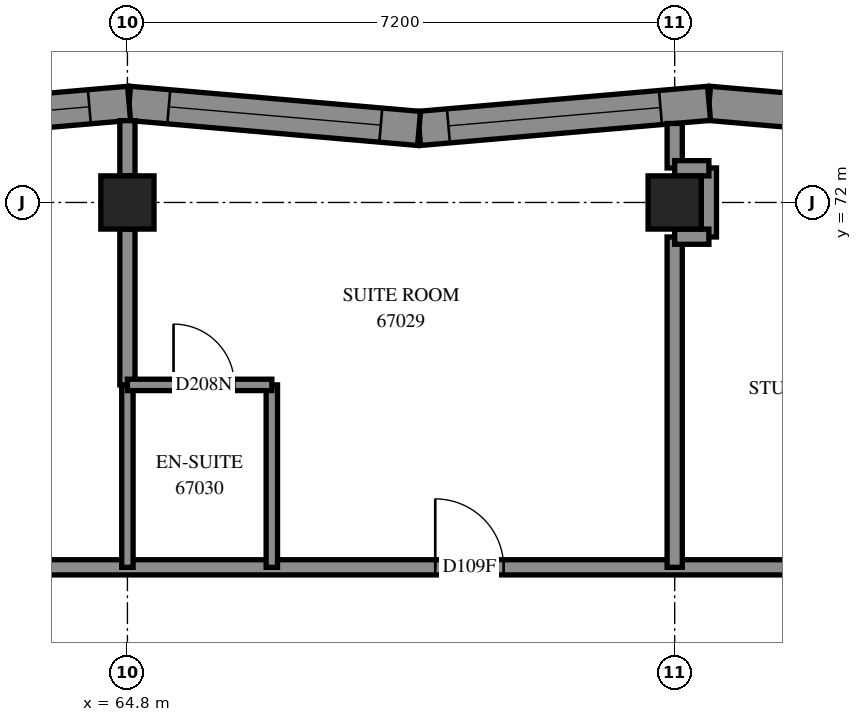
"""IFC4 building model, lengths in metres.
Left out: names, types, materials, properties, quantities, classifications, styles, units other than length and angle.
Written with IfcOpenShell. Run it as: python <this file> out.ifc"""

import sys

from ifc_helpers import new_model, si_unit, direction, frame, frame_2d, origin, origin_2d, place, context, subcontext, project, spatial, polyline, rectangle, outline, extrude, element, fill, save


model = new_model("IFC4")
c1 = context("Model", 3, precision=1e-05, world=origin(), true_north=direction((0.0, 1.0)))
c2 = subcontext(c1, "Body", "Model", "MODEL_VIEW")
j1 = project(units=[si_unit("LENGTHUNIT", "METRE"), si_unit("PLANEANGLEUNIT", "RADIAN")], contexts=[c1])
p1 = place(None, origin())
s1 = spatial("IfcSite", under=j1, at=p1, CompositionType="ELEMENT")
p2 = place(p1, origin())
s2 = spatial("IfcBuilding", under=s1, at=p2, CompositionType="ELEMENT")
p3 = place(p2, frame((0.0, 0.0, 247.2)))
s3 = spatial("IfcBuildingStorey", under=s2, at=p3, CompositionType="ELEMENT", Elevation=247.2)
for number, where, z_axis, x_axis in (
    (1, (64.8, 72.0, 0.0), (0.0, 0.0, 1.0), (1.0, 0.0, 0.0)),
    (2, (72.0, 72.0, 0.0), (0.0, 0.0, 1.0), (1.0, 0.0, 0.0)),
):
    element("IfcColumn", number, at=place(p3, frame(where, z_axis=z_axis, x_axis=x_axis)), inside=s3, PredefinedType="COLUMN", context=c2, shape_type="SweptSolid", body=[
        extrude(rectangle(XDim=0.7, YDim=0.7, at=origin_2d()), origin(), (0.0, 0.0, 1.0), 3.1),
    ])
p4 = place(p3, frame((76.285, 72.973, 0.0), z_axis=(0.0, 0.0, 1.0), x_axis=(-0.9962801831, 0.0861730629, 0.0)))
e3 = element("IfcWall", 3, at=p4, inside=s3, PredefinedType="SOLIDWALL", context=c2, shape_type="SweptSolid", body=[
    extrude(outline(polyline([(0.037, -0.225), (3.866, -0.225), (3.827, 0.225), (-0.037, 0.225), (0.037, -0.225)])), origin(), (0.0, 0.0, 1.0), 3.1),
])
p5 = place(p4, frame((1.557, 0.0, 0.45)))
e4 = element("IfcOpeningElement", 4, at=p5, cuts=e3, PredefinedType="OPENING", context=c2, shape_type="SweptSolid", body=[
    extrude(rectangle(XDim=1.2, YDim=2.55, at=frame_2d((0.6, 1.275))), frame((0.0, 0.235, 0.0), z_axis=(0.0, -1.0, 0.0), x_axis=(1.0, 0.0, 0.0)), (0.0, 0.0, 1.0), 0.47),
])
p6 = place(p3, frame((72.452, 73.304, 0.0), z_axis=(0.0, 0.0, 1.0), x_axis=(-0.9962800708, -0.0861743613, 0.0)))
e5 = element("IfcWall", 5, at=p6, inside=s3, PredefinedType="SOLIDWALL", context=c2, shape_type="SweptSolid", body=[
    extrude(outline(polyline([(-0.019, -0.225), (3.81, -0.225), (3.849, 0.225), (0.019, 0.225), (-0.019, -0.225)])), origin(), (0.0, 0.0, 1.0), 3.1),
])
p7 = place(p6, frame((0.641, 0.0, 0.45)))
e6 = element("IfcOpeningElement", 6, at=p7, cuts=e5, PredefinedType="OPENING", context=c2, shape_type="SweptSolid", body=[
    extrude(rectangle(XDim=2.8, YDim=2.55, at=frame_2d((1.4, 1.275))), frame((0.0, 0.235, 0.0), z_axis=(0.0, -1.0, 0.0), x_axis=(1.0, 0.0, 0.0)), (0.0, 0.0, 1.0), 0.47),
])
p8 = place(p3, frame((68.637, 72.974, 0.0), z_axis=(0.0, 0.0, 1.0), x_axis=(-0.9962798769, 0.0861766033, 0.0)))
e7 = element("IfcWall", 7, at=p8, inside=s3, PredefinedType="SOLIDWALL", context=c2, shape_type="SweptSolid", body=[
    extrude(outline(polyline([(0.019, -0.225), (3.849, -0.225), (3.81, 0.225), (-0.019, 0.225), (0.019, -0.225)])), origin(), (0.0, 0.0, 1.0), 3.1),
])
p9 = place(p8, frame((0.505, 0.0, 0.45)))
e8 = element("IfcOpeningElement", 8, at=p9, cuts=e7, PredefinedType="OPENING", context=c2, shape_type="SweptSolid", body=[
    extrude(rectangle(XDim=2.8, YDim=2.55, at=frame_2d((1.4, 1.275))), frame((0.0, 0.235, 0.0), z_axis=(0.0, -1.0, 0.0), x_axis=(1.0, 0.0, 0.0)), (0.0, 0.0, 1.0), 0.47),
])
p10 = place(p3, frame((64.822, 73.304, 0.0), z_axis=(0.0, 0.0, 1.0), x_axis=(-0.9962800708, -0.0861743613, 0.0)))
e9 = element("IfcWall", 9, at=p10, inside=s3, PredefinedType="SOLIDWALL", context=c2, shape_type="SweptSolid", body=[
    extrude(outline(polyline([(-0.019, -0.225), (3.81, -0.225), (3.849, 0.225), (0.019, 0.225), (-0.019, -0.225)])), origin(), (0.0, 0.0, 1.0), 3.1),
])
p11 = place(p10, frame((0.524, 0.0, 0.45)))
e10 = element("IfcOpeningElement", 10, at=p11, cuts=e9, PredefinedType="OPENING", context=c2, shape_type="SweptSolid", body=[
    extrude(rectangle(XDim=2.8, YDim=2.55, at=frame_2d((1.4, 1.275))), frame((0.0, 0.235, 0.0), z_axis=(0.0, -1.0, 0.0), x_axis=(1.0, 0.0, 0.0)), (0.0, 0.0, 1.0), 0.47),
])
p12 = place(p3, frame((55.2, 67.2, 0.0), z_axis=(0.0, 0.0, 1.0), x_axis=(1.0, 0.0, 0.0)))
e11 = element("IfcWall", 11, at=p12, inside=s3, PredefinedType="PARTITIONING", context=c2, shape_type="SweptSolid", body=[
    extrude(rectangle(XDim=19.2, YDim=0.2, at=frame_2d((9.6, 0.0))), origin(), (0.0, 0.0, 1.0), 3.1),
])
p13 = place(p12, frame((6.299, 0.0, 0.0)))
e12 = element("IfcOpeningElement", 12, at=p13, cuts=e11, PredefinedType="OPENING", context=c2, shape_type="SweptSolid", body=[
    extrude(rectangle(XDim=0.9, YDim=2.1, at=frame_2d((0.45, 1.05))), frame((0.0, 0.11, 0.0), z_axis=(0.0, -1.0, 0.0), x_axis=(1.0, 0.0, 0.0)), (0.0, 0.0, 1.0), 0.22),
])
p14 = place(p12, frame((13.65, 0.0, 0.0)))
e13 = element("IfcOpeningElement", 13, at=p14, cuts=e11, PredefinedType="OPENING", context=c2, shape_type="SweptSolid", body=[
    extrude(rectangle(XDim=0.9, YDim=2.1, at=frame_2d((0.45, 1.05))), frame((0.0, 0.11, 0.0), z_axis=(0.0, -1.0, 0.0), x_axis=(1.0, 0.0, 0.0)), (0.0, 0.0, 1.0), 0.22),
])
p15 = place(p3, frame((72.0, 67.2, 0.0), z_axis=(0.0, 0.0, 1.0), x_axis=(0.0, 1.0, 0.0)))
e14 = element("IfcWall", 14, at=p15, inside=s3, PredefinedType="PARTITIONING", context=c2, shape_type="SweptSolid", body=[
    extrude(rectangle(XDim=4.346, YDim=0.2, at=frame_2d((2.173, 0.0))), origin(), (0.0, 0.0, 1.0), 3.1),
])
for number, where, z_axis, x_axis in (
    (15, (66.7, 67.2, 0.0), (0.0, 0.0, 1.0), (0.0, 1.0, 0.0)),
    (16, (64.8, 67.2, 0.0), (0.0, 0.0, 1.0), (0.0, 1.0, 0.0)),
):
    element("IfcWall", number, at=place(p3, frame(where, z_axis=z_axis, x_axis=x_axis)), inside=s3, PredefinedType="PARTITIONING", context=c2, shape_type="SweptSolid", body=[
        extrude(rectangle(XDim=2.4, YDim=0.15, at=frame_2d((1.2, 0.0))), origin(), (0.0, 0.0, 1.0), 3.1),
    ])
p16 = place(p3, frame((64.8, 69.6, 0.0), z_axis=(0.0, 0.0, 1.0), x_axis=(0.0, 1.0, 0.0)))
e17 = element("IfcWall", 17, at=p16, inside=s3, PredefinedType="PARTITIONING", context=c2, shape_type="SweptSolid", body=[
    extrude(rectangle(XDim=2.05, YDim=0.2, at=frame_2d((1.025, 0.0))), origin(), (0.0, 0.0, 1.0), 3.1),
])
p17 = place(p3, frame((64.8, 69.6, 0.0), z_axis=(0.0, 0.0, 1.0), x_axis=(1.0, 0.0, 0.0)))
e18 = element("IfcWall", 18, at=p17, inside=s3, PredefinedType="PARTITIONING", context=c2, shape_type="SweptSolid", body=[
    extrude(rectangle(XDim=1.9, YDim=0.15, at=frame_2d((0.95, 0.0))), origin(), (0.0, 0.0, 1.0), 3.1),
])
p18 = place(p17, frame((0.607, 0.0, 0.0)))
e19 = element("IfcOpeningElement", 19, at=p18, cuts=e18, PredefinedType="OPENING", context=c2, shape_type="SweptSolid", body=[
    extrude(rectangle(XDim=0.8, YDim=2.1, at=frame_2d((0.4, 1.05))), frame((0.0, 0.085, 0.0), z_axis=(0.0, -1.0, 0.0), x_axis=(1.0, 0.0, 0.0)), (0.0, 0.0, 1.0), 0.17),
])
p19 = place(p3, frame((72.45, 71.546, 0.0), z_axis=(0.0, 0.0, 1.0), x_axis=(0.0, 1.0, 0.0)))
e20 = element("IfcWall", 20, at=p19, inside=s3, PredefinedType="PARTITIONING", context=c2, shape_type="SweptSolid", body=[
    extrude(rectangle(XDim=0.908, YDim=0.2, at=frame_2d((0.454, 0.0))), origin(), (0.0, 0.0, 1.0), 3.1),
])
p20 = place(p3, frame((64.8, 72.35, 0.0), z_axis=(0.0, 0.0, 1.0), x_axis=(0.0, 1.0, 0.0)))
e21 = element("IfcWall", 21, at=p20, inside=s3, PredefinedType="PARTITIONING", context=c2, shape_type="SweptSolid", body=[
    extrude(rectangle(XDim=0.726, YDim=0.2, at=frame_2d((0.363, 0.0))), origin(), (0.0, 0.0, 1.0), 3.1),
])
p21 = place(p3, frame((72.0, 72.454, 0.0), z_axis=(0.0, 0.0, 1.0), x_axis=(0.0, 1.0, 0.0)))
e22 = element("IfcWall", 22, at=p21, inside=s3, PredefinedType="PARTITIONING", context=c2, shape_type="SweptSolid", body=[
    extrude(rectangle(XDim=0.585, YDim=0.2, at=frame_2d((0.293, 0.0))), origin(), (0.0, 0.0, 1.0), 3.1),
])
for number, where, z_axis, x_axis in (
    (23, (72.0, 71.55, 0.0), (0.0, 0.0, 1.0), (1.0, 0.0, 0.0)),
    (24, (72.0, 72.45, 0.0), (0.0, 0.0, 1.0), (1.0, 0.0, 0.0)),
):
    element("IfcWall", number, at=place(p3, frame(where, z_axis=z_axis, x_axis=x_axis)), inside=s3, PredefinedType="PARTITIONING", context=c2, shape_type="SweptSolid", body=[
        extrude(rectangle(XDim=0.45, YDim=0.2, at=frame_2d((0.225, 0.0))), origin(), (0.0, 0.0, 1.0), 3.1),
    ])
p22 = place(p7, origin())
e25 = element("IfcWindow", 25, at=p22, inside=s3, PartitioningType="SINGLE_PANEL", PredefinedType="WINDOW", context=c2, shape_type="SweptSolid", body=[
    extrude(rectangle(XDim=2.8, YDim=2.55, at=frame_2d((1.4, 1.275))), frame((0.0, 0.205, 0.0), z_axis=(0.0, -1.0, 0.0), x_axis=(1.0, 0.0, 0.0)), (0.0, 0.0, 1.0), 0.06),
])
fill(e6, e25)
p23 = place(p9, origin())
e26 = element("IfcWindow", 26, at=p23, inside=s3, PartitioningType="SINGLE_PANEL", PredefinedType="WINDOW", context=c2, shape_type="SweptSolid", body=[
    extrude(rectangle(XDim=2.8, YDim=2.55, at=frame_2d((1.4, 1.275))), frame((0.0, 0.205, 0.0), z_axis=(0.0, -1.0, 0.0), x_axis=(1.0, 0.0, 0.0)), (0.0, 0.0, 1.0), 0.06),
])
fill(e8, e26)
p24 = place(p11, origin())
e27 = element("IfcWindow", 27, at=p24, inside=s3, PartitioningType="SINGLE_PANEL", PredefinedType="WINDOW", context=c2, shape_type="SweptSolid", body=[
    extrude(rectangle(XDim=2.8, YDim=2.55, at=frame_2d((1.4, 1.275))), frame((0.0, 0.205, 0.0), z_axis=(0.0, -1.0, 0.0), x_axis=(1.0, 0.0, 0.0)), (0.0, 0.0, 1.0), 0.06),
])
fill(e10, e27)
p25 = place(p14, origin())
e28 = element("IfcDoor", 28, at=p25, inside=s3, OperationType="SINGLE_SWING_RIGHT", PredefinedType="DOOR", context=c2, shape_type="SweptSolid", body=[
    extrude(rectangle(XDim=0.9, YDim=2.1, at=frame_2d((0.45, 1.05))), frame((0.0, 0.025, 0.0), z_axis=(0.0, -1.0, 0.0), x_axis=(1.0, 0.0, 0.0)), (0.0, 0.0, 1.0), 0.05),
])
fill(e13, e28)
p26 = place(p18, origin())
e29 = element("IfcDoor", 29, at=p26, inside=s3, OperationType="SINGLE_SWING_RIGHT", PredefinedType="DOOR", context=c2, shape_type="SweptSolid", body=[
    extrude(rectangle(XDim=0.8, YDim=2.1, at=frame_2d((0.4, 1.05))), frame((0.0, 0.025, 0.0), z_axis=(0.0, -1.0, 0.0), x_axis=(1.0, 0.0, 0.0)), (0.0, 0.0, 1.0), 0.05),
])
fill(e19, e29)
save(model, sys.argv[1])
